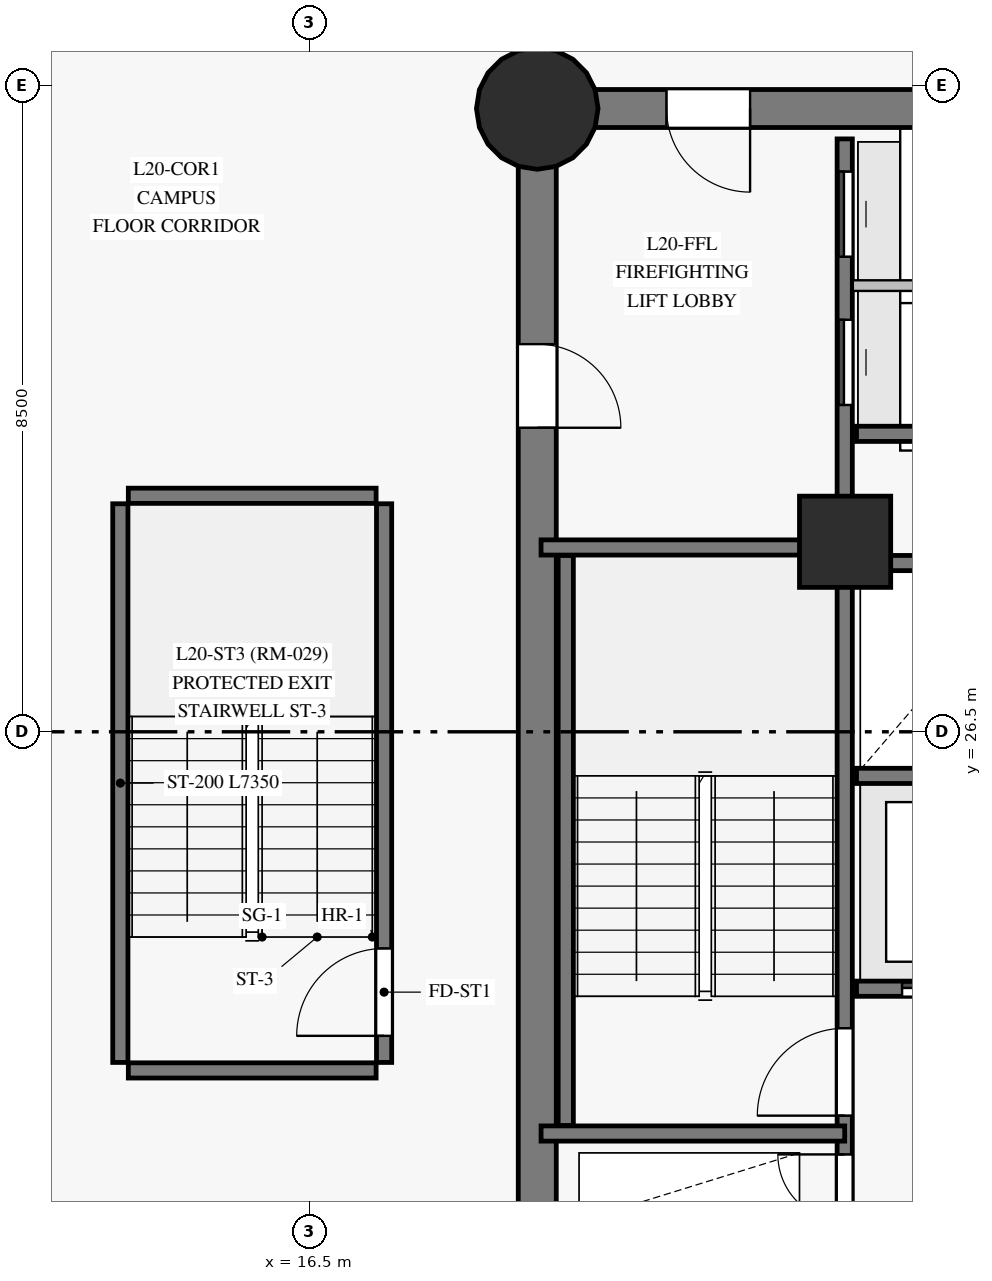
"""IFC4 building model, lengths in metres.
Left out: names, types, materials, properties, quantities, classifications, styles, units other than length and angle.
Written with IfcOpenShell. Run it as: python <this file> out.ifc"""

import sys

from ifc_helpers import new_model, si_unit, direction, frame, frame_2d, origin, origin_with_axes, origin_2d, place, context, subcontext, project, spatial, rectangle, circle, extrude, source, transform, mapped, element, fill, save


model = new_model("IFC4")
c1 = context("Model", 3, precision=1e-05, world=origin(), true_north=direction((0.0, 1.0)))
c2 = subcontext(c1, "Body", "Model", "MODEL_VIEW")
j1 = project(units=[si_unit("LENGTHUNIT", "METRE"), si_unit("PLANEANGLEUNIT", "RADIAN")], contexts=[c1])
p1 = place(None, origin())
s1 = spatial("IfcSite", under=j1, at=p1, CompositionType="ELEMENT")
p2 = place(p1, origin())
s2 = spatial("IfcBuilding", under=s1, at=p2, CompositionType="ELEMENT")
p3 = place(p2, frame((0.0, 0.0, 76.9)))
s3 = spatial("IfcBuildingStorey", under=s2, at=p3, CompositionType="ELEMENT", Elevation=76.9)
p4 = place(p3, frame((26.55, 34.7, 0.0), z_axis=(0.0, 0.0, 1.0), x_axis=(-1.0, 0.0, 0.0)))
e1 = element("IfcWall", 1, at=p4, inside=s3, PredefinedType="SHEAR", context=c2, shape_type="SweptSolid", body=[
    extrude(rectangle(XDim=7.05, YDim=0.5, at=frame_2d((3.525, 0.0))), origin(), (0.0, 0.0, 1.0), 3.35),
])
p5 = place(p4, frame((4.25, 0.0, 0.0)))
e2 = element("IfcOpeningElement", 2, at=p5, cuts=e1, PredefinedType="OPENING", context=c2, shape_type="SweptSolid", body=[
    extrude(rectangle(XDim=1.1, YDim=2.15, at=frame_2d((0.55, 1.075))), frame((0.0, 0.26, 0.0), z_axis=(0.0, -1.0, 0.0), x_axis=(1.0, 0.0, 0.0)), (0.0, 0.0, 1.0), 0.52),
])
p6 = place(p3, frame((19.5, 34.7, 0.0), z_axis=(0.0, 0.0, 1.0), x_axis=(0.0, -1.0, 0.0)))
e3 = element("IfcWall", 3, at=p6, inside=s3, PredefinedType="SHEAR", context=c2, shape_type="SweptSolid", body=[
    extrude(rectangle(XDim=16.4, YDim=0.5, at=frame_2d((8.2, 0.0))), origin(), (0.0, 0.0, 1.0), 3.35),
])
p7 = place(p6, frame((3.1, 0.0, 0.0)))
e4 = element("IfcOpeningElement", 4, at=p7, cuts=e3, PredefinedType="OPENING", context=c2, shape_type="SweptSolid", body=[
    extrude(rectangle(XDim=1.1, YDim=2.15, at=frame_2d((0.55, 1.075))), frame((0.0, 0.26, 0.0), z_axis=(0.0, -1.0, 0.0), x_axis=(1.0, 0.0, 0.0)), (0.0, 0.0, 1.0), 0.52),
])
m1 = source(origin_with_axes(), c2, "Body", "SweptSolid", [
    extrude(circle(Radius=0.8, at=origin_2d()), origin(), (0.0, 0.0, 1.0), 3.6),
])
p8 = place(p3, frame((19.5, 34.7, 0.0), z_axis=(0.0, 0.0, 1.0), x_axis=(1.0, 0.0, 0.0)))
e5 = element("IfcColumn", 5, at=p8, inside=s3, PredefinedType="COLUMN", context=c2, shape_type="MappedRepresentation", body=[
    mapped(m1, transform((0.0, 0.0, 0.0), scale=1.0)),
])
m2 = source(origin_with_axes(), c2, "Body", "SweptSolid", [
    extrude(rectangle(XDim=1.2, YDim=1.2, at=origin_2d()), origin(), (0.0, 0.0, 1.0), 3.6),
])
p9 = place(p3, frame((23.55, 29.0, 0.0), z_axis=(0.0, 0.0, 1.0), x_axis=(1.0, 0.0, 0.0)))
e6 = element("IfcColumn", 6, at=p9, inside=s3, PredefinedType="COLUMN", context=c2, shape_type="MappedRepresentation", body=[
    mapped(m2, transform((0.0, 0.0, 0.0), scale=1.0)),
])
p10 = place(p3, frame((23.545, 18.7, 0.0), z_axis=(0.0, 0.0, 1.0), x_axis=(0.0, 1.0, 0.0)))
e7 = element("IfcWall", 7, at=p10, inside=s3, PredefinedType="SHEAR", context=c2, shape_type="SweptSolid", body=[
    extrude(rectangle(XDim=15.6, YDim=0.2, at=frame_2d((7.8, 0.0))), origin(), (0.0, 0.0, 1.0), 3.35),
])
p11 = place(p10, frame((2.75, 0.0, 0.0)))
e8 = element("IfcOpeningElement", 8, at=p11, cuts=e7, PredefinedType="OPENING", context=c2, shape_type="SweptSolid", body=[
    extrude(rectangle(XDim=1.15, YDim=2.15, at=frame_2d((0.575, 1.075))), frame((0.0, 0.11, 0.0), z_axis=(0.0, -1.0, 0.0), x_axis=(1.0, 0.0, 0.0)), (0.0, 0.0, 1.0), 0.22),
])
p12 = place(p10, frame((0.14, 0.0, 0.0)))
e9 = element("IfcOpeningElement", 9, at=p12, cuts=e7, PredefinedType="OPENING", context=c2, shape_type="SweptSolid", body=[
    extrude(rectangle(XDim=0.88, YDim=2.1, at=frame_2d((0.44, 1.05))), frame((0.0, 0.11, 0.0), z_axis=(0.0, -1.0, 0.0), x_axis=(1.0, 0.0, 0.0)), (0.0, 0.0, 1.0), 0.22),
])
p13 = place(p10, frame((1.36, 0.0, 0.0)))
e10 = element("IfcOpeningElement", 10, at=p13, cuts=e7, PredefinedType="OPENING", context=c2, shape_type="SweptSolid", body=[
    extrude(rectangle(XDim=0.88, YDim=2.1, at=frame_2d((0.44, 1.05))), frame((0.0, 0.11, 0.0), z_axis=(0.0, -1.0, 0.0), x_axis=(1.0, 0.0, 0.0)), (0.0, 0.0, 1.0), 0.22),
])
p14 = place(p10, frame((12.1, 0.0, 0.0)))
e11 = element("IfcOpeningElement", 11, at=p14, cuts=e7, PredefinedType="OPENING", context=c2, shape_type="SweptSolid", body=[
    extrude(rectangle(XDim=1.12, YDim=2.15, at=frame_2d((0.56, 1.075))), frame((0.0, 0.11, 0.0), z_axis=(0.0, -1.0, 0.0), x_axis=(1.0, 0.0, 0.0)), (0.0, 0.0, 1.0), 0.22),
])
p15 = place(p10, frame((14.05, 0.0, 0.0)))
e12 = element("IfcOpeningElement", 12, at=p15, cuts=e7, PredefinedType="OPENING", context=c2, shape_type="SweptSolid", body=[
    extrude(rectangle(XDim=1.12, YDim=2.15, at=frame_2d((0.56, 1.075))), frame((0.0, 0.11, 0.0), z_axis=(0.0, -1.0, 0.0), x_axis=(1.0, 0.0, 0.0)), (0.0, 0.0, 1.0), 0.22),
])
p16 = place(p3, frame((23.7, 23.12, 0.0), z_axis=(0.0, 0.0, 1.0), x_axis=(1.0, 0.0, 0.0)))
e13 = element("IfcWall", 13, at=p16, inside=s3, PredefinedType="SHEAR", context=c2, shape_type="SweptSolid", body=[
    extrude(rectangle(XDim=9.6, YDim=0.2, at=frame_2d((4.8, 0.0))), origin(), (0.0, 0.0, 1.0), 3.35),
])
p17 = place(p16, frame((0.6, 0.0, 0.0)))
e14 = element("IfcOpeningElement", 14, at=p17, cuts=e13, PredefinedType="OPENING", context=c2, shape_type="SweptSolid", body=[
    extrude(rectangle(XDim=1.1, YDim=2.15, at=frame_2d((0.55, 1.075))), frame((0.0, 0.11, 0.0), z_axis=(0.0, -1.0, 0.0), x_axis=(1.0, 0.0, 0.0)), (0.0, 0.0, 1.0), 0.22),
])
p18 = place(p16, frame((2.98, 0.0, 0.0)))
e15 = element("IfcOpeningElement", 15, at=p18, cuts=e13, PredefinedType="OPENING", context=c2, shape_type="SweptSolid", body=[
    extrude(rectangle(XDim=1.1, YDim=2.15, at=frame_2d((0.55, 1.075))), frame((0.0, 0.11, 0.0), z_axis=(0.0, -1.0, 0.0), x_axis=(1.0, 0.0, 0.0)), (0.0, 0.0, 1.0), 0.22),
])
p19 = place(p16, frame((5.36, 0.0, 0.0)))
e16 = element("IfcOpeningElement", 16, at=p19, cuts=e13, PredefinedType="OPENING", context=c2, shape_type="SweptSolid", body=[
    extrude(rectangle(XDim=1.1, YDim=2.15, at=frame_2d((0.55, 1.075))), frame((0.0, 0.11, 0.0), z_axis=(0.0, -1.0, 0.0), x_axis=(1.0, 0.0, 0.0)), (0.0, 0.0, 1.0), 0.22),
])
p20 = place(p16, frame((7.74, 0.0, 0.0)))
e17 = element("IfcOpeningElement", 17, at=p20, cuts=e13, PredefinedType="OPENING", context=c2, shape_type="SweptSolid", body=[
    extrude(rectangle(XDim=1.1, YDim=2.15, at=frame_2d((0.55, 1.075))), frame((0.0, 0.11, 0.0), z_axis=(0.0, -1.0, 0.0), x_axis=(1.0, 0.0, 0.0)), (0.0, 0.0, 1.0), 0.22),
])
for number, where, z_axis, x_axis in (
    (18, (23.7, 25.92, 0.0), (0.0, 0.0, 1.0), (1.0, 0.0, 0.0)),
    (19, (23.7, 28.72, 0.0), (0.0, 0.0, 1.0), (1.0, 0.0, 0.0)),
):
    element("IfcWall", number, at=place(p3, frame(where, z_axis=z_axis, x_axis=x_axis)), inside=s3, PredefinedType="SHEAR", context=c2, shape_type="SweptSolid", body=[
        extrude(rectangle(XDim=9.6, YDim=0.2, at=frame_2d((4.8, 0.0))), origin(), (0.0, 0.0, 1.0), 3.35),
    ])
p21 = place(p3, frame((19.875, 21.32, 0.0), z_axis=(0.0, 0.0, 1.0), x_axis=(0.0, 1.0, 0.0)))
e20 = element("IfcWall", 20, at=p21, inside=s3, PredefinedType="SHEAR", context=c2, shape_type="SweptSolid", body=[
    extrude(rectangle(XDim=7.5, YDim=0.2, at=frame_2d((3.75, 0.0))), origin(), (0.0, 0.0, 1.0), 3.35),
])
p22 = place(p3, frame((14.015, 22.15, 0.0), z_axis=(0.0, 0.0, 1.0), x_axis=(0.0, 1.0, 0.0)))
e21 = element("IfcWall", 21, at=p22, inside=s3, PredefinedType="SHEAR", context=c2, shape_type="SweptSolid", body=[
    extrude(rectangle(XDim=7.35, YDim=0.2, at=frame_2d((3.675, 0.0))), origin(), (0.0, 0.0, 1.0), 3.35),
])
p23 = place(p3, frame((17.485, 22.15, 0.0), z_axis=(0.0, 0.0, 1.0), x_axis=(0.0, 1.0, 0.0)))
e22 = element("IfcWall", 22, at=p23, inside=s3, PredefinedType="SHEAR", context=c2, shape_type="SweptSolid", body=[
    extrude(rectangle(XDim=7.35, YDim=0.2, at=frame_2d((3.675, 0.0))), origin(), (0.0, 0.0, 1.0), 3.35),
])
p24 = place(p23, frame((0.35, 0.0, 0.0)))
e23 = element("IfcOpeningElement", 23, at=p24, cuts=e22, PredefinedType="OPENING", context=c2, shape_type="SweptSolid", body=[
    extrude(rectangle(XDim=1.15, YDim=2.15, at=frame_2d((0.575, 1.075))), frame((0.0, 0.11, 0.0), z_axis=(0.0, -1.0, 0.0), x_axis=(1.0, 0.0, 0.0)), (0.0, 0.0, 1.0), 0.22),
])
for number, where, z_axis, x_axis in (
    (24, (19.55, 21.215, 0.0), (0.0, 0.0, 1.0), (1.0, 0.0, 0.0)),
    (25, (19.55, 28.925, 0.0), (0.0, 0.0, 1.0), (1.0, 0.0, 0.0)),
):
    element("IfcWall", number, at=place(p3, frame(where, z_axis=z_axis, x_axis=x_axis)), inside=s3, PredefinedType="SHEAR", context=c2, shape_type="SweptSolid", body=[
        extrude(rectangle(XDim=3.995, YDim=0.2, at=frame_2d((1.998, 0.0))), origin(), (0.0, 0.0, 1.0), 3.35),
    ])
for number, where, z_axis, x_axis in (
    (26, (14.12, 22.045, 0.0), (0.0, 0.0, 1.0), (1.0, 0.0, 0.0)),
    (27, (14.12, 29.605, 0.0), (0.0, 0.0, 1.0), (1.0, 0.0, 0.0)),
):
    element("IfcWall", number, at=place(p3, frame(where, z_axis=z_axis, x_axis=x_axis)), inside=s3, PredefinedType="SHEAR", context=c2, shape_type="SweptSolid", body=[
        extrude(rectangle(XDim=3.26, YDim=0.2, at=frame_2d((1.63, 0.0))), origin(), (0.0, 0.0, 1.0), 3.35),
    ])
p25 = place(p3, frame((23.7, 30.42, 0.0), z_axis=(0.0, 0.0, 1.0), x_axis=(1.0, 0.0, 0.0)))
e28 = element("IfcWall", 28, at=p25, inside=s3, PredefinedType="SHEAR", context=c2, shape_type="SweptSolid", body=[
    extrude(rectangle(XDim=2.78, YDim=0.2, at=frame_2d((1.39, 0.0))), origin(), (0.0, 0.0, 1.0), 3.35),
])
p26 = place(p3, frame((23.652, 32.37, 0.0), z_axis=(0.0, 0.0, 1.0), x_axis=(1.0, 0.0, 0.0)))
e29 = element("IfcWall", 29, at=p26, inside=s3, PredefinedType="PARTITIONING", context=c2, shape_type="SweptSolid", body=[
    extrude(rectangle(XDim=2.828, YDim=0.14, at=frame_2d((1.414, 0.0))), origin(), (0.0, 0.0, 1.0), 3.35),
])
m3 = source(origin_with_axes(), c2, "Body", "SweptSolid", [
    extrude(rectangle(XDim=1.15, YDim=2.15, at=frame_2d((0.575, 1.075))), frame((0.0, 0.025, 0.0), z_axis=(0.0, -1.0, 0.0), x_axis=(1.0, 0.0, 0.0)), (0.0, 0.0, 1.0), 0.05),
])
p27 = place(p11, origin())
e30 = element("IfcDoor", 30, at=p27, inside=s3, OperationType="SINGLE_SWING_LEFT", PredefinedType="DOOR", context=c2, shape_type="MappedRepresentation", body=[
    mapped(m3, transform((0.0, 0.0, 0.0), scale=1.0)),
])
fill(e8, e30)
m4 = source(origin_with_axes(), c2, "Body", "SweptSolid", [
    extrude(rectangle(XDim=1.1, YDim=2.15, at=frame_2d((0.55, 1.075))), frame((0.0, 0.025, 0.0), z_axis=(0.0, -1.0, 0.0), x_axis=(1.0, 0.0, 0.0)), (0.0, 0.0, 1.0), 0.05),
])
p28 = place(p5, origin())
e31 = element("IfcDoor", 31, at=p28, inside=s3, OperationType="SINGLE_SWING_LEFT", PredefinedType="DOOR", context=c2, shape_type="MappedRepresentation", body=[
    mapped(m4, transform((0.0, 0.0, 0.0), scale=1.0)),
])
fill(e2, e31)
p29 = place(p7, origin())
e32 = element("IfcDoor", 32, at=p29, inside=s3, OperationType="SINGLE_SWING_RIGHT", PredefinedType="DOOR", context=c2, shape_type="MappedRepresentation", body=[
    mapped(m4, transform((0.0, 0.0, 0.0), scale=1.0)),
])
fill(e4, e32)
m5 = source(origin_with_axes(), c2, "Body", "SweptSolid", [
    extrude(rectangle(XDim=0.88, YDim=2.1, at=frame_2d((0.44, 1.05))), frame((0.0, 0.025, 0.0), z_axis=(0.0, -1.0, 0.0), x_axis=(1.0, 0.0, 0.0)), (0.0, 0.0, 1.0), 0.05),
])
p30 = place(p13, origin())
e33 = element("IfcDoor", 33, at=p30, inside=s3, OperationType="SINGLE_SWING_RIGHT", PredefinedType="DOOR", context=c2, shape_type="MappedRepresentation", body=[
    mapped(m5, transform((0.0, 0.0, 0.0), scale=1.0)),
])
fill(e10, e33)
p31 = place(p17, origin())
e34 = element("IfcDoor", 34, at=p31, inside=s3, OperationType="SLIDING_TO_LEFT", PredefinedType="DOOR", context=c2, shape_type="MappedRepresentation", body=[
    mapped(m4, transform((0.0, 0.0, 0.0), scale=1.0)),
])
fill(e14, e34)
m6 = source(origin_with_axes(), c2, "Body", "SweptSolid", [
    extrude(rectangle(XDim=1.12, YDim=2.15, at=frame_2d((0.56, 1.075))), frame((0.0, 0.025, 0.0), z_axis=(0.0, -1.0, 0.0), x_axis=(1.0, 0.0, 0.0)), (0.0, 0.0, 1.0), 0.05),
])
p32 = place(p14, origin())
e35 = element("IfcDoor", 35, at=p32, inside=s3, OperationType="SLIDING_TO_LEFT", PredefinedType="DOOR", context=c2, shape_type="MappedRepresentation", body=[
    mapped(m6, transform((0.0, 0.0, 0.0), scale=1.0)),
])
fill(e11, e35)
p33 = place(p15, origin())
e36 = element("IfcDoor", 36, at=p33, inside=s3, OperationType="SLIDING_TO_RIGHT", PredefinedType="DOOR", context=c2, shape_type="MappedRepresentation", body=[
    mapped(m6, transform((0.0, 0.0, 0.0), scale=1.0)),
])
fill(e12, e36)
p34 = place(p24, origin())
e37 = element("IfcDoor", 37, at=p34, inside=s3, OperationType="SINGLE_SWING_LEFT", PredefinedType="DOOR", context=c2, shape_type="MappedRepresentation", body=[
    mapped(m3, transform((0.0, 0.0, 0.0), scale=1.0)),
])
fill(e23, e37)
save(model, sys.argv[1])
